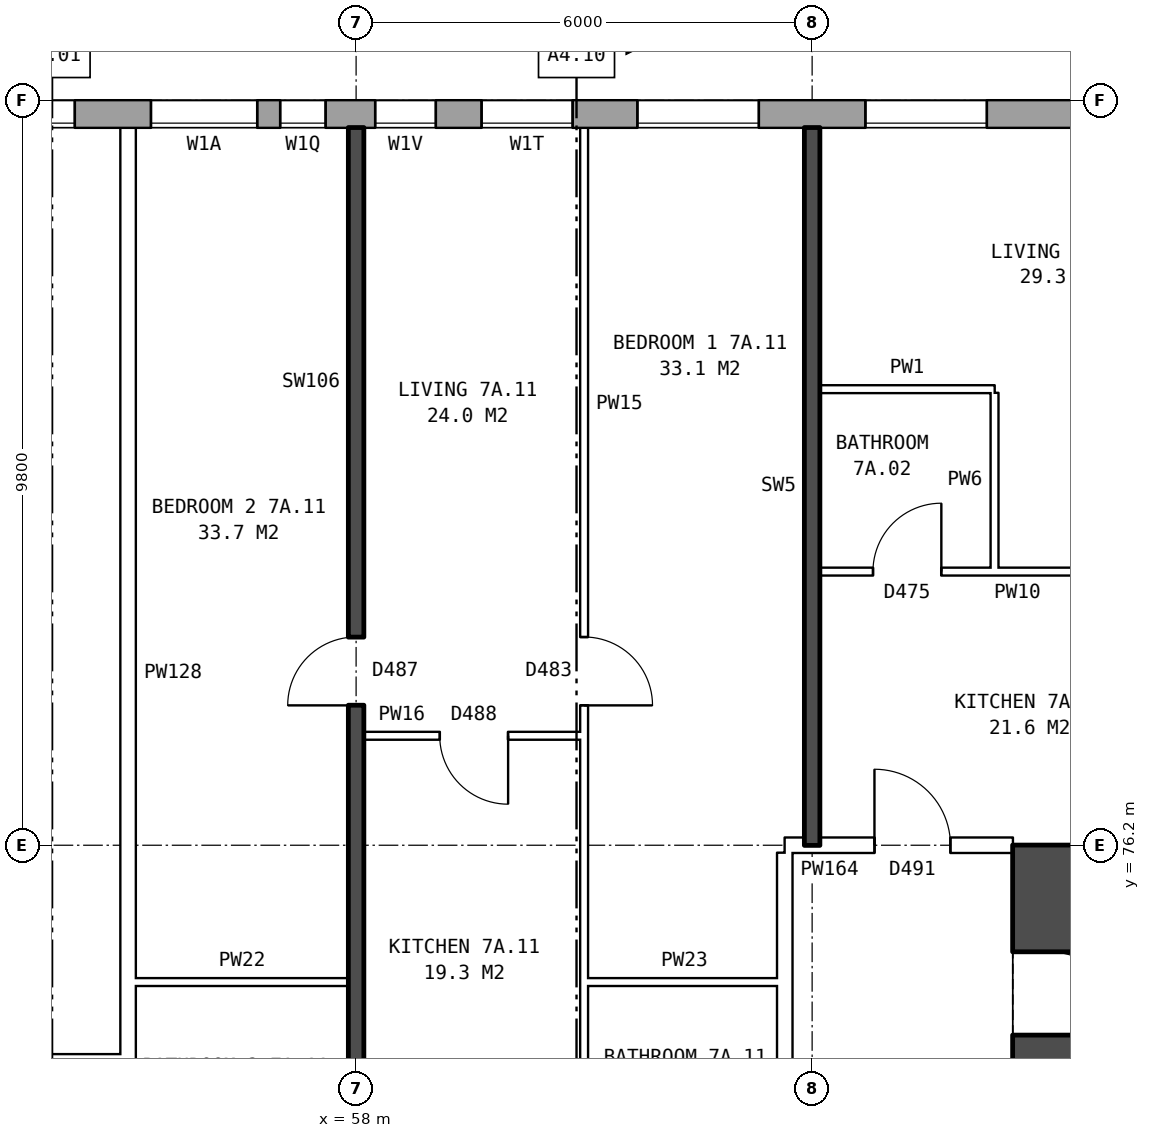
"""IFC4 building model, lengths in metres.
Left out: names, types, materials, properties, quantities, classifications, styles, units other than length and angle.
Written with IfcOpenShell. Run it as: python <this file> out.ifc"""

import sys

from ifc_helpers import new_model, si_unit, direction, frame, frame_2d, origin, place, context, subcontext, project, spatial, rectangle, extrude, element, fill, save


model = new_model("IFC4")
c1 = context("Model", 3, precision=1e-05, world=origin(), true_north=direction((0.0, 1.0)))
c2 = subcontext(c1, "Body", "Model", "MODEL_VIEW")
j1 = project(units=[si_unit("LENGTHUNIT", "METRE"), si_unit("PLANEANGLEUNIT", "RADIAN")], contexts=[c1])
p1 = place(None, origin())
s1 = spatial("IfcSite", under=j1, at=p1, CompositionType="ELEMENT")
p2 = place(p1, origin())
s2 = spatial("IfcBuilding", under=s1, at=p2, CompositionType="ELEMENT")
p3 = place(p2, frame((0.0, 0.0, 28.8)))
s3 = spatial("IfcBuildingStorey", under=s2, at=p3, CompositionType="ELEMENT", Elevation=28.8)
p4 = place(p3, frame((72.925, 85.82, 0.0), z_axis=(0.0, 0.0, 1.0), x_axis=(-1.0, 0.0, 0.0)))
e1 = element("IfcWall", 1, at=p4, inside=s3, PredefinedType="STANDARD", context=c2, shape_type="SweptSolid", body=[
    extrude(rectangle(XDim=50.101, YDim=0.36, at=frame_2d((25.05, 0.0))), origin(), (0.0, 0.0, 1.0), 2.85),
])
p5 = place(p4, frame((0.625, 0.0, 0.8)))
e2 = element("IfcOpeningElement", 2, at=p5, cuts=e1, PredefinedType="OPENING", context=c2, shape_type="SweptSolid", body=[
    extrude(rectangle(XDim=1.6, YDim=1.8, at=frame_2d((0.8, 0.9))), frame((0.0, 0.19, 0.0), z_axis=(0.0, -1.0, 0.0), x_axis=(1.0, 0.0, 0.0)), (0.0, 0.0, 1.0), 0.38),
])
p6 = place(p4, frame((3.625, 0.0, 0.8)))
e3 = element("IfcOpeningElement", 3, at=p6, cuts=e1, PredefinedType="OPENING", context=c2, shape_type="SweptSolid", body=[
    extrude(rectangle(XDim=1.6, YDim=1.8, at=frame_2d((0.8, 0.9))), frame((0.0, 0.19, 0.0), z_axis=(0.0, -1.0, 0.0), x_axis=(1.0, 0.0, 0.0)), (0.0, 0.0, 1.0), 0.38),
])
p7 = place(p4, frame((6.625, 0.0, 0.8)))
e4 = element("IfcOpeningElement", 4, at=p7, cuts=e1, PredefinedType="OPENING", context=c2, shape_type="SweptSolid", body=[
    extrude(rectangle(XDim=1.6, YDim=1.8, at=frame_2d((0.8, 0.9))), frame((0.0, 0.19, 0.0), z_axis=(0.0, -1.0, 0.0), x_axis=(1.0, 0.0, 0.0)), (0.0, 0.0, 1.0), 0.38),
])
p8 = place(p4, frame((9.625, 0.0, 0.8)))
e5 = element("IfcOpeningElement", 5, at=p8, cuts=e1, PredefinedType="OPENING", context=c2, shape_type="SweptSolid", body=[
    extrude(rectangle(XDim=1.6, YDim=1.8, at=frame_2d((0.8, 0.9))), frame((0.0, 0.19, 0.0), z_axis=(0.0, -1.0, 0.0), x_axis=(1.0, 0.0, 0.0)), (0.0, 0.0, 1.0), 0.38),
])
p9 = place(p4, frame((12.075, 0.0, 1.65)))
e6 = element("IfcOpeningElement", 6, at=p9, cuts=e1, PredefinedType="OPENING", context=c2, shape_type="SweptSolid", body=[
    extrude(rectangle(XDim=1.2, YDim=0.9, at=frame_2d((0.6, 0.45))), frame((0.0, 0.19, 0.0), z_axis=(0.0, -1.0, 0.0), x_axis=(1.0, 0.0, 0.0)), (0.0, 0.0, 1.0), 0.38),
])
p10 = place(p4, frame((15.325, 0.0, 0.8)))
e7 = element("IfcOpeningElement", 7, at=p10, cuts=e1, PredefinedType="OPENING", context=c2, shape_type="SweptSolid", body=[
    extrude(rectangle(XDim=0.6, YDim=1.2, at=frame_2d((0.3, 0.6))), frame((0.0, 0.19, 0.0), z_axis=(0.0, -1.0, 0.0), x_axis=(1.0, 0.0, 0.0)), (0.0, 0.0, 1.0), 0.38),
])
p11 = place(p4, frame((18.625, 0.0, 0.8)))
e8 = element("IfcOpeningElement", 8, at=p11, cuts=e1, PredefinedType="OPENING", context=c2, shape_type="SweptSolid", body=[
    extrude(rectangle(XDim=1.6, YDim=1.8, at=frame_2d((0.8, 0.9))), frame((0.0, 0.19, 0.0), z_axis=(0.0, -1.0, 0.0), x_axis=(1.0, 0.0, 0.0)), (0.0, 0.0, 1.0), 0.38),
])
p12 = place(p4, frame((21.625, 0.0, 0.8)))
e9 = element("IfcOpeningElement", 9, at=p12, cuts=e1, PredefinedType="OPENING", context=c2, shape_type="SweptSolid", body=[
    extrude(rectangle(XDim=1.6, YDim=1.8, at=frame_2d((0.8, 0.9))), frame((0.0, 0.19, 0.0), z_axis=(0.0, -1.0, 0.0), x_axis=(1.0, 0.0, 0.0)), (0.0, 0.0, 1.0), 0.38),
])
p13 = place(p4, frame((24.625, 0.0, 0.8)))
e10 = element("IfcOpeningElement", 10, at=p13, cuts=e1, PredefinedType="OPENING", context=c2, shape_type="SweptSolid", body=[
    extrude(rectangle(XDim=1.6, YDim=1.8, at=frame_2d((0.8, 0.9))), frame((0.0, 0.19, 0.0), z_axis=(0.0, -1.0, 0.0), x_axis=(1.0, 0.0, 0.0)), (0.0, 0.0, 1.0), 0.38),
])
p14 = place(p4, frame((27.625, 0.0, 0.8)))
e11 = element("IfcOpeningElement", 11, at=p14, cuts=e1, PredefinedType="OPENING", context=c2, shape_type="SweptSolid", body=[
    extrude(rectangle(XDim=1.6, YDim=1.8, at=frame_2d((0.8, 0.9))), frame((0.0, 0.19, 0.0), z_axis=(0.0, -1.0, 0.0), x_axis=(1.0, 0.0, 0.0)), (0.0, 0.0, 1.0), 0.38),
])
p15 = place(p4, frame((30.625, 0.0, 0.8)))
e12 = element("IfcOpeningElement", 12, at=p15, cuts=e1, PredefinedType="OPENING", context=c2, shape_type="SweptSolid", body=[
    extrude(rectangle(XDim=1.6, YDim=1.8, at=frame_2d((0.8, 0.9))), frame((0.0, 0.19, 0.0), z_axis=(0.0, -1.0, 0.0), x_axis=(1.0, 0.0, 0.0)), (0.0, 0.0, 1.0), 0.38),
])
p16 = place(p4, frame((33.125, 0.0, 0.8)))
e13 = element("IfcOpeningElement", 13, at=p16, cuts=e1, PredefinedType="OPENING", context=c2, shape_type="SweptSolid", body=[
    extrude(rectangle(XDim=1.2, YDim=1.5, at=frame_2d((0.6, 0.75))), frame((0.0, 0.19, 0.0), z_axis=(0.0, -1.0, 0.0), x_axis=(1.0, 0.0, 0.0)), (0.0, 0.0, 1.0), 0.38),
])
p17 = place(p4, frame((36.675, 0.0, 1.7)))
e14 = element("IfcOpeningElement", 14, at=p17, cuts=e1, PredefinedType="OPENING", context=c2, shape_type="SweptSolid", body=[
    extrude(rectangle(XDim=0.6, YDim=0.9, at=frame_2d((0.3, 0.45))), frame((0.0, 0.19, 0.0), z_axis=(0.0, -1.0, 0.0), x_axis=(1.0, 0.0, 0.0)), (0.0, 0.0, 1.0), 0.38),
])
p18 = place(p4, frame((39.625, 0.0, 0.8)))
e15 = element("IfcOpeningElement", 15, at=p18, cuts=e1, PredefinedType="OPENING", context=c2, shape_type="SweptSolid", body=[
    extrude(rectangle(XDim=1.6, YDim=1.8, at=frame_2d((0.8, 0.9))), frame((0.0, 0.19, 0.0), z_axis=(0.0, -1.0, 0.0), x_axis=(1.0, 0.0, 0.0)), (0.0, 0.0, 1.0), 0.38),
])
p19 = place(p4, frame((42.625, 0.0, 0.8)))
e16 = element("IfcOpeningElement", 16, at=p19, cuts=e1, PredefinedType="OPENING", context=c2, shape_type="SweptSolid", body=[
    extrude(rectangle(XDim=1.6, YDim=1.8, at=frame_2d((0.8, 0.9))), frame((0.0, 0.19, 0.0), z_axis=(0.0, -1.0, 0.0), x_axis=(1.0, 0.0, 0.0)), (0.0, 0.0, 1.0), 0.38),
])
p20 = place(p4, frame((45.625, 0.0, 0.8)))
e17 = element("IfcOpeningElement", 17, at=p20, cuts=e1, PredefinedType="OPENING", context=c2, shape_type="SweptSolid", body=[
    extrude(rectangle(XDim=1.6, YDim=1.8, at=frame_2d((0.8, 0.9))), frame((0.0, 0.19, 0.0), z_axis=(0.0, -1.0, 0.0), x_axis=(1.0, 0.0, 0.0)), (0.0, 0.0, 1.0), 0.38),
])
p21 = place(p4, frame((13.875, 0.0, 0.15)))
e18 = element("IfcOpeningElement", 18, at=p21, cuts=e1, PredefinedType="OPENING", context=c2, shape_type="SweptSolid", body=[
    extrude(rectangle(XDim=0.8, YDim=0.9, at=frame_2d((0.4, 0.45))), frame((0.0, 0.19, 0.0), z_axis=(0.0, -1.0, 0.0), x_axis=(1.0, 0.0, 0.0)), (0.0, 0.0, 1.0), 0.38),
])
p22 = place(p4, frame((16.225, 0.0, 0.8)))
e19 = element("IfcOpeningElement", 19, at=p22, cuts=e1, PredefinedType="OPENING", context=c2, shape_type="SweptSolid", body=[
    extrude(rectangle(XDim=1.4, YDim=1.8, at=frame_2d((0.7, 0.9))), frame((0.0, 0.19, 0.0), z_axis=(0.0, -1.0, 0.0), x_axis=(1.0, 0.0, 0.0)), (0.0, 0.0, 1.0), 0.38),
])
p23 = place(p4, frame((34.625, 0.0, 0.8)))
e20 = element("IfcOpeningElement", 20, at=p23, cuts=e1, PredefinedType="OPENING", context=c2, shape_type="SweptSolid", body=[
    extrude(rectangle(XDim=0.6, YDim=0.9, at=frame_2d((0.3, 0.45))), frame((0.0, 0.19, 0.0), z_axis=(0.0, -1.0, 0.0), x_axis=(1.0, 0.0, 0.0)), (0.0, 0.0, 1.0), 0.38),
])
p24 = place(p4, frame((37.575, 0.0, 1.1)))
e21 = element("IfcOpeningElement", 21, at=p24, cuts=e1, PredefinedType="OPENING", context=c2, shape_type="SweptSolid", body=[
    extrude(rectangle(XDim=1.0, YDim=1.5, at=frame_2d((0.5, 0.75))), frame((0.0, 0.19, 0.0), z_axis=(0.0, -1.0, 0.0), x_axis=(1.0, 0.0, 0.0)), (0.0, 0.0, 1.0), 0.38),
])
p25 = place(p3, frame((67.09, 64.7, 0.0), z_axis=(0.0, 0.0, 1.0), x_axis=(0.0, 1.0, 0.0)))
e22 = element("IfcWall", 22, at=p25, inside=s3, PredefinedType="SHEAR", context=c2, shape_type="SweptSolid", body=[
    extrude(rectangle(XDim=10.6, YDim=0.9, at=frame_2d((5.3, 0.0))), origin(), (0.0, 0.0, 1.0), 2.85),
])
p26 = place(p25, frame((0.425, 0.0, 0.0)))
e23 = element("IfcOpeningElement", 23, at=p26, cuts=e22, PredefinedType="OPENING", context=c2, shape_type="SweptSolid", body=[
    extrude(rectangle(XDim=1.1, YDim=2.1, at=frame_2d((0.55, 1.05))), frame((0.0, 0.46, 0.0), z_axis=(0.0, -1.0, 0.0), x_axis=(1.0, 0.0, 0.0)), (0.0, 0.0, 1.0), 0.92),
])
p27 = place(p25, frame((9.0, 0.0, 0.0)))
e24 = element("IfcOpeningElement", 24, at=p27, cuts=e22, PredefinedType="OPENING", context=c2, shape_type="SweptSolid", body=[
    extrude(rectangle(XDim=1.1, YDim=2.1, at=frame_2d((0.55, 1.05))), frame((0.0, 0.46, 0.0), z_axis=(0.0, -1.0, 0.0), x_axis=(1.0, 0.0, 0.0)), (0.0, 0.0, 1.0), 0.92),
])
p28 = place(p3, frame((66.64, 75.75, 0.0), z_axis=(0.0, 0.0, 1.0), x_axis=(1.0, 0.0, 0.0)))
e25 = element("IfcWall", 25, at=p28, inside=s3, PredefinedType="SHEAR", context=c2, shape_type="SweptSolid", body=[
    extrude(rectangle(XDim=9.0, YDim=0.9, at=frame_2d((4.5, 0.0))), origin(), (0.0, 0.0, 1.0), 2.85),
])
p29 = place(p3, frame((63.64, 63.9, 0.0), z_axis=(0.0, 0.0, 1.0), x_axis=(0.0, 1.0, 0.0)))
e26 = element("IfcWall", 26, at=p29, inside=s3, PredefinedType="PARTITIONING", context=c2, shape_type="SweptSolid", body=[
    extrude(rectangle(XDim=12.2, YDim=0.2, at=frame_2d((6.1, 0.0))), origin(), (0.0, 0.0, 1.0), 2.85),
])
p30 = place(p29, frame((5.1, 0.0, 0.0)))
e27 = element("IfcOpeningElement", 27, at=p30, cuts=e26, PredefinedType="OPENING", context=c2, shape_type="SweptSolid", body=[
    extrude(rectangle(XDim=2.0, YDim=2.1, at=frame_2d((1.0, 1.05))), frame((0.0, 0.11, 0.0), z_axis=(0.0, -1.0, 0.0), x_axis=(1.0, 0.0, 0.0)), (0.0, 0.0, 1.0), 0.22),
])
for number, where, z_axis, x_axis in (
    (28, (52.1, 73.4, 0.0), (0.0, 0.0, 1.0), (1.0, 0.0, 0.0)),
    (29, (55.1, 74.4, 0.0), (0.0, 0.0, 1.0), (1.0, 0.0, 0.0)),
):
    element("IfcWall", number, at=place(p3, frame(where, z_axis=z_axis, x_axis=x_axis)), inside=s3, PredefinedType="PARTITIONING", context=c2, shape_type="SweptSolid", body=[
        extrude(rectangle(XDim=2.8, YDim=0.1, at=frame_2d((1.4, 0.0))), origin(), (0.0, 0.0, 1.0), 2.85),
    ])
p31 = place(p3, frame((61.0, 74.4, 0.0), z_axis=(0.0, 0.0, 1.0), x_axis=(1.0, 0.0, 0.0)))
e30 = element("IfcWall", 30, at=p31, inside=s3, PredefinedType="PARTITIONING", context=c2, shape_type="SweptSolid", body=[
    extrude(rectangle(XDim=2.64, YDim=0.1, at=frame_2d((1.32, 0.0))), origin(), (0.0, 0.0, 1.0), 2.85),
])
p32 = place(p3, frame((63.64, 76.2, 0.0), z_axis=(0.0, 0.0, 1.0), x_axis=(1.0, 0.0, 0.0)))
e31 = element("IfcWall", 31, at=p32, inside=s3, PredefinedType="PARTITIONING", context=c2, shape_type="SweptSolid", body=[
    extrude(rectangle(XDim=3.0, YDim=0.2, at=frame_2d((1.5, 0.0))), origin(), (0.0, 0.0, 1.0), 2.85),
])
p33 = place(p32, frame((1.18, 0.0, 0.0)))
e32 = element("IfcOpeningElement", 32, at=p33, cuts=e31, PredefinedType="OPENING", context=c2, shape_type="SweptSolid", body=[
    extrude(rectangle(XDim=1.0, YDim=2.1, at=frame_2d((0.5, 1.05))), frame((0.0, 0.11, 0.0), z_axis=(0.0, -1.0, 0.0), x_axis=(1.0, 0.0, 0.0)), (0.0, 0.0, 1.0), 0.22),
])
p34 = place(p3, frame((58.1, 77.64, 0.0), z_axis=(0.0, 0.0, 1.0), x_axis=(1.0, 0.0, 0.0)))
e33 = element("IfcWall", 33, at=p34, inside=s3, PredefinedType="PARTITIONING", context=c2, shape_type="SweptSolid", body=[
    extrude(rectangle(XDim=2.9, YDim=0.1, at=frame_2d((1.45, 0.0))), origin(), (0.0, 0.0, 1.0), 2.85),
])
p35 = place(p34, frame((1.0, 0.0, 0.0)))
e34 = element("IfcOpeningElement", 34, at=p35, cuts=e33, PredefinedType="OPENING", context=c2, shape_type="SweptSolid", body=[
    extrude(rectangle(XDim=0.9, YDim=2.1, at=frame_2d((0.45, 1.05))), frame((0.0, 0.06, 0.0), z_axis=(0.0, -1.0, 0.0), x_axis=(1.0, 0.0, 0.0)), (0.0, 0.0, 1.0), 0.12),
])
p36 = place(p3, frame((64.1, 79.8, 0.0), z_axis=(0.0, 0.0, 1.0), x_axis=(1.0, 0.0, 0.0)))
e35 = element("IfcWall", 35, at=p36, inside=s3, PredefinedType="PARTITIONING", context=c2, shape_type="SweptSolid", body=[
    extrude(rectangle(XDim=5.8, YDim=0.1, at=frame_2d((2.9, 0.0))), origin(), (0.0, 0.0, 1.0), 2.85),
])
p37 = place(p36, frame((3.6, 0.0, 0.0)))
e36 = element("IfcOpeningElement", 36, at=p37, cuts=e35, PredefinedType="OPENING", context=c2, shape_type="SweptSolid", body=[
    extrude(rectangle(XDim=0.9, YDim=2.1, at=frame_2d((0.45, 1.05))), frame((0.0, 0.06, 0.0), z_axis=(0.0, -1.0, 0.0), x_axis=(1.0, 0.0, 0.0)), (0.0, 0.0, 1.0), 0.12),
])
p38 = place(p36, frame((0.7, 0.0, 0.0)))
e37 = element("IfcOpeningElement", 37, at=p38, cuts=e35, PredefinedType="OPENING", context=c2, shape_type="SweptSolid", body=[
    extrude(rectangle(XDim=0.9, YDim=2.1, at=frame_2d((0.45, 1.05))), frame((0.0, 0.06, 0.0), z_axis=(0.0, -1.0, 0.0), x_axis=(1.0, 0.0, 0.0)), (0.0, 0.0, 1.0), 0.12),
])
p39 = place(p3, frame((64.1, 82.2, 0.0), z_axis=(0.0, 0.0, 1.0), x_axis=(1.0, 0.0, 0.0)))
e38 = element("IfcWall", 38, at=p39, inside=s3, PredefinedType="PARTITIONING", context=c2, shape_type="SweptSolid", body=[
    extrude(rectangle(XDim=2.3, YDim=0.1, at=frame_2d((1.15, 0.0))), origin(), (0.0, 0.0, 1.0), 2.85),
])
p40 = place(p3, frame((55.0, 71.3, 0.0), z_axis=(0.0, 0.0, 1.0), x_axis=(0.0, 1.0, 0.0)))
e39 = element("IfcWall", 39, at=p40, inside=s3, PredefinedType="PARTITIONING", context=c2, shape_type="SweptSolid", body=[
    extrude(rectangle(XDim=14.34, YDim=0.2, at=frame_2d((7.17, 0.0))), origin(), (0.0, 0.0, 1.0), 2.85),
])
p41 = place(p3, frame((58.0, 71.2, 0.0), z_axis=(0.0, 0.0, 1.0), x_axis=(0.0, 1.0, 0.0)))
e40 = element("IfcWall", 40, at=p41, inside=s3, PredefinedType="SOLIDWALL", context=c2, shape_type="SweptSolid", body=[
    extrude(rectangle(XDim=14.44, YDim=0.2, at=frame_2d((7.22, 0.0))), origin(), (0.0, 0.0, 1.0), 2.85),
])
p42 = place(p41, frame((6.84, 0.0, 0.0)))
e41 = element("IfcOpeningElement", 41, at=p42, cuts=e40, PredefinedType="OPENING", context=c2, shape_type="SweptSolid", body=[
    extrude(rectangle(XDim=0.9, YDim=2.1, at=frame_2d((0.45, 1.05))), frame((0.0, 0.11, 0.0), z_axis=(0.0, -1.0, 0.0), x_axis=(1.0, 0.0, 0.0)), (0.0, 0.0, 1.0), 0.22),
])
p43 = place(p41, frame((0.4, 0.0, 0.0)))
e42 = element("IfcOpeningElement", 42, at=p43, cuts=e40, PredefinedType="OPENING", context=c2, shape_type="SweptSolid", body=[
    extrude(rectangle(XDim=0.9, YDim=2.1, at=frame_2d((0.45, 1.05))), frame((0.0, 0.11, 0.0), z_axis=(0.0, -1.0, 0.0), x_axis=(1.0, 0.0, 0.0)), (0.0, 0.0, 1.0), 0.22),
])
p44 = place(p3, frame((61.0, 71.3, 0.0), z_axis=(0.0, 0.0, 1.0), x_axis=(0.0, 1.0, 0.0)))
e43 = element("IfcWall", 43, at=p44, inside=s3, PredefinedType="PARTITIONING", context=c2, shape_type="SweptSolid", body=[
    extrude(rectangle(XDim=14.34, YDim=0.1, at=frame_2d((7.17, 0.0))), origin(), (0.0, 0.0, 1.0), 2.85),
])
p45 = place(p44, frame((6.74, 0.0, 0.0)))
e44 = element("IfcOpeningElement", 44, at=p45, cuts=e43, PredefinedType="OPENING", context=c2, shape_type="SweptSolid", body=[
    extrude(rectangle(XDim=0.9, YDim=2.1, at=frame_2d((0.45, 1.05))), frame((0.0, 0.06, 0.0), z_axis=(0.0, -1.0, 0.0), x_axis=(1.0, 0.0, 0.0)), (0.0, 0.0, 1.0), 0.12),
])
p46 = place(p44, frame((0.4, 0.0, 0.0)))
e45 = element("IfcOpeningElement", 45, at=p46, cuts=e43, PredefinedType="OPENING", context=c2, shape_type="SweptSolid", body=[
    extrude(rectangle(XDim=0.9, YDim=2.1, at=frame_2d((0.45, 1.05))), frame((0.0, 0.06, 0.0), z_axis=(0.0, -1.0, 0.0), x_axis=(1.0, 0.0, 0.0)), (0.0, 0.0, 1.0), 0.12),
])
p47 = place(p3, frame((64.0, 76.2, 0.0), z_axis=(0.0, 0.0, 1.0), x_axis=(0.0, 1.0, 0.0)))
e46 = element("IfcWall", 46, at=p47, inside=s3, PredefinedType="SOLIDWALL", context=c2, shape_type="SweptSolid", body=[
    extrude(rectangle(XDim=9.44, YDim=0.2, at=frame_2d((4.72, 0.0))), origin(), (0.0, 0.0, 1.0), 2.85),
])
p48 = place(p3, frame((66.4, 79.85, 0.0), z_axis=(0.0, 0.0, 1.0), x_axis=(0.0, 1.0, 0.0)))
e47 = element("IfcWall", 47, at=p48, inside=s3, PredefinedType="PARTITIONING", context=c2, shape_type="SweptSolid", body=[
    extrude(rectangle(XDim=2.3, YDim=0.1, at=frame_2d((1.15, 0.0))), origin(), (0.0, 0.0, 1.0), 2.85),
])
p49 = place(p7, origin())
e48 = element("IfcWindow", 48, at=p49, inside=s3, PartitioningType="SINGLE_PANEL", PredefinedType="WINDOW", context=c2, shape_type="SweptSolid", body=[
    extrude(rectangle(XDim=1.6, YDim=1.8, at=frame_2d((0.8, 0.9))), frame((0.0, 0.15, 0.0), z_axis=(0.0, -1.0, 0.0), x_axis=(1.0, 0.0, 0.0)), (0.0, 0.0, 1.0), 0.06),
])
fill(e4, e48)
p50 = place(p8, origin())
e49 = element("IfcWindow", 49, at=p50, inside=s3, PartitioningType="SINGLE_PANEL", PredefinedType="WINDOW", context=c2, shape_type="SweptSolid", body=[
    extrude(rectangle(XDim=1.6, YDim=1.8, at=frame_2d((0.8, 0.9))), frame((0.0, 0.15, 0.0), z_axis=(0.0, -1.0, 0.0), x_axis=(1.0, 0.0, 0.0)), (0.0, 0.0, 1.0), 0.06),
])
fill(e5, e49)
p51 = place(p9, origin())
e50 = element("IfcWindow", 50, at=p51, inside=s3, PartitioningType="SINGLE_PANEL", PredefinedType="WINDOW", context=c2, shape_type="SweptSolid", body=[
    extrude(rectangle(XDim=1.2, YDim=0.9, at=frame_2d((0.6, 0.45))), frame((0.0, 0.15, 0.0), z_axis=(0.0, -1.0, 0.0), x_axis=(1.0, 0.0, 0.0)), (0.0, 0.0, 1.0), 0.06),
])
fill(e6, e50)
p52 = place(p10, origin())
e51 = element("IfcWindow", 51, at=p52, inside=s3, PartitioningType="SINGLE_PANEL", PredefinedType="WINDOW", context=c2, shape_type="SweptSolid", body=[
    extrude(rectangle(XDim=0.6, YDim=1.2, at=frame_2d((0.3, 0.6))), frame((0.0, 0.15, 0.0), z_axis=(0.0, -1.0, 0.0), x_axis=(1.0, 0.0, 0.0)), (0.0, 0.0, 1.0), 0.06),
])
fill(e7, e51)
p53 = place(p11, origin())
e52 = element("IfcWindow", 52, at=p53, inside=s3, PartitioningType="SINGLE_PANEL", PredefinedType="WINDOW", context=c2, shape_type="SweptSolid", body=[
    extrude(rectangle(XDim=1.6, YDim=1.8, at=frame_2d((0.8, 0.9))), frame((0.0, 0.15, 0.0), z_axis=(0.0, -1.0, 0.0), x_axis=(1.0, 0.0, 0.0)), (0.0, 0.0, 1.0), 0.06),
])
fill(e8, e52)
p54 = place(p33, origin())
e53 = element("IfcDoor", 53, at=p54, inside=s3, OperationType="SINGLE_SWING_LEFT", PredefinedType="DOOR", context=c2, shape_type="SweptSolid", body=[
    extrude(rectangle(XDim=1.0, YDim=2.1, at=frame_2d((0.5, 1.05))), frame((0.0, 0.025, 0.0), z_axis=(0.0, -1.0, 0.0), x_axis=(1.0, 0.0, 0.0)), (0.0, 0.0, 1.0), 0.05),
])
fill(e32, e53)
p55 = place(p38, origin())
e54 = element("IfcDoor", 54, at=p55, inside=s3, OperationType="SINGLE_SWING_RIGHT", PredefinedType="DOOR", context=c2, shape_type="SweptSolid", body=[
    extrude(rectangle(XDim=0.9, YDim=2.1, at=frame_2d((0.45, 1.05))), frame((0.0, 0.025, 0.0), z_axis=(0.0, -1.0, 0.0), x_axis=(1.0, 0.0, 0.0)), (0.0, 0.0, 1.0), 0.05),
])
fill(e37, e54)
p56 = place(p45, frame((0.9, 0.0, 0.0), z_axis=(0.0, 0.0, 1.0), x_axis=(-1.0, 0.0, 0.0)))
e55 = element("IfcDoor", 55, at=p56, inside=s3, OperationType="SINGLE_SWING_RIGHT", PredefinedType="DOOR", context=c2, shape_type="SweptSolid", body=[
    extrude(rectangle(XDim=0.9, YDim=2.1, at=frame_2d((0.45, 1.05))), frame((0.0, 0.025, 0.0), z_axis=(0.0, -1.0, 0.0), x_axis=(1.0, 0.0, 0.0)), (0.0, 0.0, 1.0), 0.05),
])
fill(e44, e55)
p57 = place(p42, origin())
e56 = element("IfcDoor", 56, at=p57, inside=s3, OperationType="SINGLE_SWING_LEFT", PredefinedType="DOOR", context=c2, shape_type="SweptSolid", body=[
    extrude(rectangle(XDim=0.9, YDim=2.1, at=frame_2d((0.45, 1.05))), frame((0.0, 0.025, 0.0), z_axis=(0.0, -1.0, 0.0), x_axis=(1.0, 0.0, 0.0)), (0.0, 0.0, 1.0), 0.05),
])
fill(e41, e56)
p58 = place(p35, frame((0.9, 0.0, 0.0), z_axis=(0.0, 0.0, 1.0), x_axis=(-1.0, 0.0, 0.0)))
e57 = element("IfcDoor", 57, at=p58, inside=s3, OperationType="SINGLE_SWING_LEFT", PredefinedType="DOOR", context=c2, shape_type="SweptSolid", body=[
    extrude(rectangle(XDim=0.9, YDim=2.1, at=frame_2d((0.45, 1.05))), frame((0.0, 0.025, 0.0), z_axis=(0.0, -1.0, 0.0), x_axis=(1.0, 0.0, 0.0)), (0.0, 0.0, 1.0), 0.05),
])
fill(e34, e57)
p59 = place(p21, origin())
e58 = element("IfcWindow", 58, at=p59, inside=s3, PartitioningType="SINGLE_PANEL", PredefinedType="WINDOW", context=c2, shape_type="SweptSolid", body=[
    extrude(rectangle(XDim=0.8, YDim=0.9, at=frame_2d((0.4, 0.45))), frame((0.0, 0.15, 0.0), z_axis=(0.0, -1.0, 0.0), x_axis=(1.0, 0.0, 0.0)), (0.0, 0.0, 1.0), 0.06),
])
fill(e18, e58)
p60 = place(p22, origin())
e59 = element("IfcWindow", 59, at=p60, inside=s3, PartitioningType="SINGLE_PANEL", PredefinedType="WINDOW", context=c2, shape_type="SweptSolid", body=[
    extrude(rectangle(XDim=1.4, YDim=1.8, at=frame_2d((0.7, 0.9))), frame((0.0, 0.15, 0.0), z_axis=(0.0, -1.0, 0.0), x_axis=(1.0, 0.0, 0.0)), (0.0, 0.0, 1.0), 0.06),
])
fill(e19, e59)
save(model, sys.argv[1])
